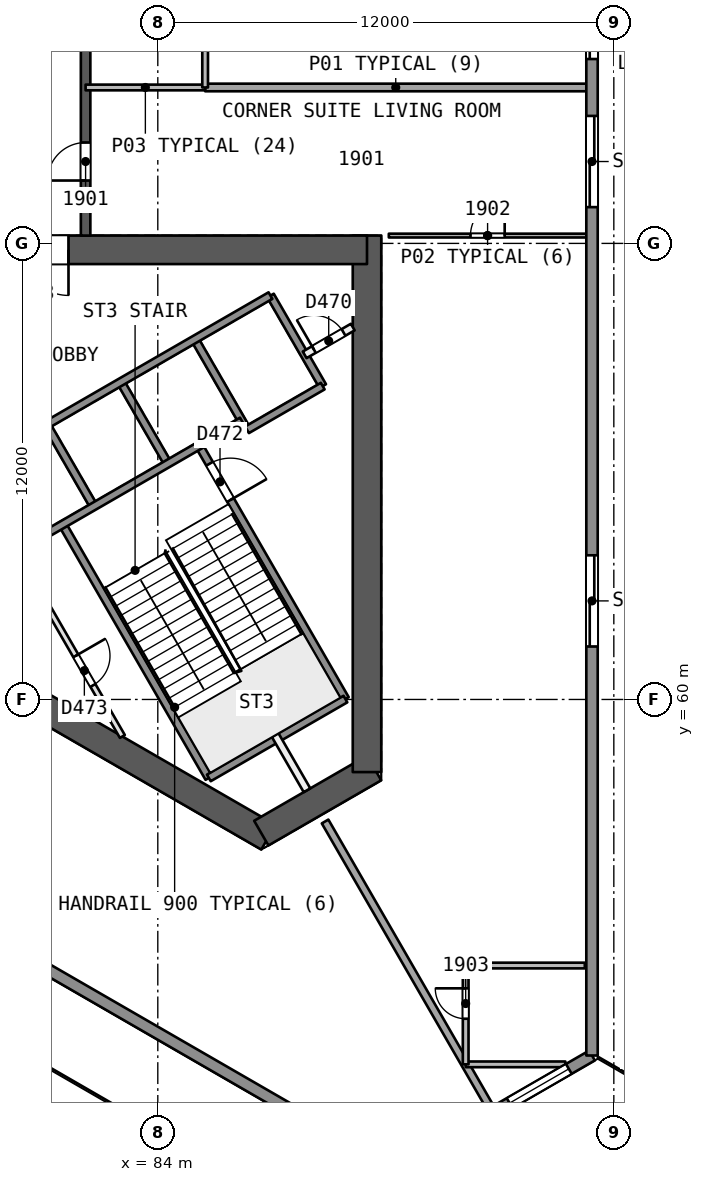
"""IFC4 building model, lengths in metres.
Left out: names, types, materials, properties, quantities, classifications, styles, units other than length and angle.
Written with IfcOpenShell. Run it as: python <this file> out.ifc"""

import sys

from ifc_helpers import new_model, si_unit, direction, frame, frame_2d, origin, place, context, subcontext, project, spatial, rectangle, extrude, element, fill, save


model = new_model("IFC4")
c1 = context("Model", 3, precision=1e-05, world=origin(), true_north=direction((0.0, 1.0)))
c2 = subcontext(c1, "Body", "Model", "MODEL_VIEW")
j1 = project(units=[si_unit("LENGTHUNIT", "METRE"), si_unit("PLANEANGLEUNIT", "RADIAN")], contexts=[c1])
p1 = place(None, origin())
s1 = spatial("IfcSite", under=j1, at=p1, CompositionType="ELEMENT")
p2 = place(p1, origin())
s2 = spatial("IfcBuilding", under=s1, at=p2, CompositionType="ELEMENT")
p3 = place(p2, frame((0.0, 0.0, 83.2)))
s3 = spatial("IfcBuildingStorey", under=s2, at=p3, CompositionType="ELEMENT", Elevation=83.2)
p4 = place(p3, frame((74.822, 63.354, 0.0), z_axis=(0.0, 0.0, 1.0), x_axis=(0.8660248072, -0.500001033313, 0.0)))
e1 = element("IfcWall", 1, at=p4, inside=s3, PredefinedType="SHEAR", context=c2, shape_type="SweptSolid", body=[
    extrude(rectangle(XDim=13.958, YDim=0.75, at=frame_2d((6.979, 0.0))), origin(), (0.0, 0.0, 1.0), 3.7),
])
p5 = place(p3, frame((86.723, 56.483, 0.0), z_axis=(0.0, 0.0, 1.0), x_axis=(0.866017201164, 0.500014207086, 0.0)))
e2 = element("IfcWall", 2, at=p5, inside=s3, PredefinedType="SHEAR", context=c2, shape_type="SweptSolid", body=[
    extrude(rectangle(XDim=3.429, YDim=0.75, at=frame_2d((1.714, 0.0))), origin(), (0.0, 0.0, 1.0), 3.7),
])
p6 = place(p3, frame((89.505, 58.089, 0.0), z_axis=(0.0, 0.0, 1.0), x_axis=(0.0, 1.0, 0.0)))
e3 = element("IfcWall", 3, at=p6, inside=s3, PredefinedType="SHEAR", context=c2, shape_type="SweptSolid", body=[
    extrude(rectangle(XDim=14.117, YDim=0.75, at=frame_2d((7.059, 0.0))), origin(), (0.0, 0.0, 1.0), 3.7),
])
p7 = place(p3, frame((89.505, 71.831, 0.0), z_axis=(0.0, 0.0, 1.0), x_axis=(-1.0, 0.0, 0.0)))
e4 = element("IfcWall", 4, at=p7, inside=s3, PredefinedType="SHEAR", context=c2, shape_type="SweptSolid", body=[
    extrude(rectangle(XDim=10.005, YDim=0.75, at=frame_2d((5.002, 0.0))), origin(), (0.0, 0.0, 1.0), 3.7),
])
p8 = place(p7, frame((7.855, 0.0, 0.0)))
e5 = element("IfcOpeningElement", 5, at=p8, cuts=e4, PredefinedType="OPENING", context=c2, shape_type="SweptSolid", body=[
    extrude(rectangle(XDim=1.2, YDim=2.1, at=frame_2d((0.6, 1.05))), frame((0.0, 0.385, 0.0), z_axis=(0.0, -1.0, 0.0), x_axis=(1.0, 0.0, 0.0)), (0.0, 0.0, 1.0), 0.771),
])
p9 = place(p3, frame((82.1, 72.206, 0.0), z_axis=(0.0, 0.0, 1.0), x_axis=(0.0, 1.0, 0.0)))
e6 = element("IfcWall", 6, at=p9, inside=s3, PredefinedType="SHEAR", context=c2, shape_type="SweptSolid", body=[
    extrude(rectangle(XDim=15.588, YDim=0.25, at=frame_2d((7.794, 0.0))), origin(), (0.0, 0.0, 1.0), 3.2),
])
p10 = place(p9, frame((1.448, 0.0, 0.0)))
e7 = element("IfcOpeningElement", 7, at=p10, cuts=e6, PredefinedType="OPENING", context=c2, shape_type="SweptSolid", body=[
    extrude(rectangle(XDim=1.0, YDim=2.1, at=frame_2d((0.5, 1.05))), frame((0.0, 0.135, 0.0), z_axis=(0.0, -1.0, 0.0), x_axis=(1.0, 0.0, 0.0)), (0.0, 0.0, 1.0), 0.271),
])
p11 = place(p9, frame((6.544, 0.0, 0.0)))
e8 = element("IfcOpeningElement", 8, at=p11, cuts=e6, PredefinedType="OPENING", context=c2, shape_type="SweptSolid", body=[
    extrude(rectangle(XDim=1.0, YDim=2.1, at=frame_2d((0.5, 1.05))), frame((0.0, 0.135, 0.0), z_axis=(0.0, -1.0, 0.0), x_axis=(1.0, 0.0, 0.0)), (0.0, 0.0, 1.0), 0.271),
])
p12 = place(p9, frame((10.441, 0.0, 0.0)))
e9 = element("IfcOpeningElement", 9, at=p12, cuts=e6, PredefinedType="OPENING", context=c2, shape_type="SweptSolid", body=[
    extrude(rectangle(XDim=1.0, YDim=2.1, at=frame_2d((0.5, 1.05))), frame((0.0, 0.135, 0.0), z_axis=(0.0, -1.0, 0.0), x_axis=(1.0, 0.0, 0.0)), (0.0, 0.0, 1.0), 0.271),
])
p13 = place(p9, frame((11.841, 0.0, 0.0)))
e10 = element("IfcOpeningElement", 10, at=p13, cuts=e6, PredefinedType="OPENING", context=c2, shape_type="SweptSolid", body=[
    extrude(rectangle(XDim=1.0, YDim=2.1, at=frame_2d((0.5, 1.05))), frame((0.0, 0.135, 0.0), z_axis=(0.0, -1.0, 0.0), x_axis=(1.0, 0.0, 0.0)), (0.0, 0.0, 1.0), 0.271),
])
p14 = place(p3, frame((90.079, 72.206, 0.0), z_axis=(0.0, 0.0, 1.0), x_axis=(1.0, 0.0, 0.0)))
e11 = element("IfcWall", 11, at=p14, inside=s3, PredefinedType="PARTITIONING", context=c2, shape_type="SweptSolid", body=[
    extrude(rectangle(XDim=5.198, YDim=0.1, at=frame_2d((2.599, 0.0))), origin(), (0.0, 0.0, 1.0), 3.2),
])
p15 = place(p14, frame((2.149, 0.0, 0.0)))
e12 = element("IfcOpeningElement", 12, at=p15, cuts=e11, PredefinedType="OPENING", context=c2, shape_type="SweptSolid", body=[
    extrude(rectangle(XDim=0.9, YDim=2.1, at=frame_2d((0.45, 1.05))), frame((0.0, 0.061, 0.0), z_axis=(0.0, -1.0, 0.0), x_axis=(1.0, 0.0, 0.0)), (0.0, 0.0, 1.0), 0.121),
])
p16 = place(p3, frame((95.277, 76.103, 0.0), z_axis=(0.0, 0.0, 1.0), x_axis=(-1.0, 0.0, 0.0)))
e13 = element("IfcWall", 13, at=p16, inside=s3, PredefinedType="PARTITIONING", context=c2, shape_type="SweptSolid", body=[
    extrude(rectangle(XDim=10.031, YDim=0.2, at=frame_2d((5.016, 0.0))), origin(), (0.0, 0.0, 1.0), 3.2),
])
p17 = place(p3, frame((85.245, 76.103, 0.0), z_axis=(0.0, 0.0, 1.0), x_axis=(-1.0, 0.0, 0.0)))
e14 = element("IfcWall", 14, at=p17, inside=s3, PredefinedType="PARTITIONING", context=c2, shape_type="SweptSolid", body=[
    extrude(rectangle(XDim=3.145, YDim=0.15, at=frame_2d((1.573, 0.0))), origin(), (0.0, 0.0, 1.0), 3.2),
])
p18 = place(p3, frame((94.725, 50.399, 0.0), z_axis=(0.0, 0.0, 1.0), x_axis=(-1.0, 0.0, 0.0)))
e15 = element("IfcWall", 15, at=p18, inside=s3, PredefinedType="PARTITIONING", context=c2, shape_type="SweptSolid", body=[
    extrude(rectangle(XDim=2.624, YDim=0.15, at=frame_2d((1.312, 0.0))), origin(), (0.0, 0.0, 1.0), 3.2),
])
p19 = place(p3, frame((92.102, 50.399, 0.0), z_axis=(0.0, 0.0, 1.0), x_axis=(0.0, 1.0, 0.0)))
e16 = element("IfcWall", 16, at=p19, inside=s3, PredefinedType="PARTITIONING", context=c2, shape_type="SweptSolid", body=[
    extrude(rectangle(XDim=2.6, YDim=0.15, at=frame_2d((1.3, 0.0))), origin(), (0.0, 0.0, 1.0), 3.2),
])
p20 = place(p19, frame((1.2, 0.0, 0.0)))
e17 = element("IfcOpeningElement", 17, at=p20, cuts=e16, PredefinedType="OPENING", context=c2, shape_type="SweptSolid", body=[
    extrude(rectangle(XDim=0.8, YDim=2.1, at=frame_2d((0.4, 1.05))), frame((0.0, 0.085, 0.0), z_axis=(0.0, -1.0, 0.0), x_axis=(1.0, 0.0, 0.0)), (0.0, 0.0, 1.0), 0.171),
])
p21 = place(p3, frame((92.102, 52.999, 0.0), z_axis=(0.0, 0.0, 1.0), x_axis=(1.0, 0.0, 0.0)))
e18 = element("IfcWall", 18, at=p21, inside=s3, PredefinedType="PARTITIONING", context=c2, shape_type="SweptSolid", body=[
    extrude(rectangle(XDim=3.134, YDim=0.15, at=frame_2d((1.567, 0.0))), origin(), (0.0, 0.0, 1.0), 3.2),
])
p22 = place(p3, frame((88.402, 56.789, 0.0), z_axis=(0.0, 0.0, 1.0), x_axis=(0.500001128573, -0.866024752202, 0.0)))
e19 = element("IfcWall", 19, at=p22, inside=s3, PredefinedType="PARTITIONING", context=c2, shape_type="SweptSolid", body=[
    extrude(rectangle(XDim=8.696, YDim=0.2, at=frame_2d((4.348, 0.0))), origin(), (0.0, 0.0, 1.0), 3.2),
])
p23 = place(p3, frame((85.245, 78.5, 0.0), z_axis=(0.0, 0.0, 1.0), x_axis=(0.0, -1.0, 0.0)))
e20 = element("IfcWall", 20, at=p23, inside=s3, PredefinedType="PARTITIONING", context=c2, shape_type="SweptSolid", body=[
    extrude(rectangle(XDim=2.397, YDim=0.15, at=frame_2d((1.199, 0.0))), origin(), (0.0, 0.0, 1.0), 3.2),
])
p24 = place(p3, frame((95.426, 50.632, 0.0), z_axis=(0.0, 0.0, 1.0), x_axis=(-0.866027298819, -0.49999671769, 0.0)))
e21 = element("IfcWall", 21, at=p24, inside=s3, PredefinedType="SOLIDWALL", context=c2, shape_type="SweptSolid", body=[
    extrude(rectangle(XDim=6.01, YDim=0.3, at=frame_2d((3.005, 0.0))), origin(), (0.0, 0.0, 1.0), 3.2),
])
p25 = place(p24, frame((0.705, 0.0, 0.9)))
e22 = element("IfcOpeningElement", 22, at=p25, cuts=e21, PredefinedType="OPENING", context=c2, shape_type="SweptSolid", body=[
    extrude(rectangle(XDim=1.8, YDim=1.5, at=frame_2d((0.9, 0.75))), frame((0.0, 0.161, 0.0), z_axis=(0.0, -1.0, 0.0), x_axis=(1.0, 0.0, 0.0)), (0.0, 0.0, 1.0), 0.321),
])
p26 = place(p24, frame((3.651, 0.0, 0.9)))
e23 = element("IfcOpeningElement", 23, at=p26, cuts=e21, PredefinedType="OPENING", context=c2, shape_type="SweptSolid", body=[
    extrude(rectangle(XDim=1.8, YDim=1.5, at=frame_2d((0.9, 0.75))), frame((0.0, 0.161, 0.0), z_axis=(0.0, -1.0, 0.0), x_axis=(1.0, 0.0, 0.0)), (0.0, 0.0, 1.0), 0.321),
])
p27 = place(p3, frame((95.426, 109.368, 0.0), z_axis=(0.0, 0.0, 1.0), x_axis=(0.0, -1.0, 0.0)))
e24 = element("IfcWall", 24, at=p27, inside=s3, PredefinedType="SOLIDWALL", context=c2, shape_type="SweptSolid", body=[
    extrude(rectangle(XDim=58.737, YDim=0.3, at=frame_2d((29.368, 0.0))), origin(), (0.0, 0.0, 1.0), 3.2),
])
p28 = place(p27, frame((34.014, 0.0, 0.0)))
e25 = element("IfcOpeningElement", 25, at=p28, cuts=e24, PredefinedType="OPENING", context=c2, shape_type="SweptSolid", body=[
    extrude(rectangle(XDim=2.4, YDim=2.4, at=frame_2d((1.2, 1.2))), frame((0.0, 0.161, 0.0), z_axis=(0.0, -1.0, 0.0), x_axis=(1.0, 0.0, 0.0)), (0.0, 0.0, 1.0), 0.321),
])
p29 = place(p27, frame((45.575, 0.0, 0.0)))
e26 = element("IfcOpeningElement", 26, at=p29, cuts=e24, PredefinedType="OPENING", context=c2, shape_type="SweptSolid", body=[
    extrude(rectangle(XDim=2.4, YDim=2.4, at=frame_2d((1.2, 1.2))), frame((0.0, 0.161, 0.0), z_axis=(0.0, -1.0, 0.0), x_axis=(1.0, 0.0, 0.0)), (0.0, 0.0, 1.0), 0.321),
])
p30 = place(p27, frame((30.117, 0.0, 0.0)))
e27 = element("IfcOpeningElement", 27, at=p30, cuts=e24, PredefinedType="OPENING", context=c2, shape_type="SweptSolid", body=[
    extrude(rectangle(XDim=2.4, YDim=2.4, at=frame_2d((1.2, 1.2))), frame((0.0, 0.161, 0.0), z_axis=(0.0, -1.0, 0.0), x_axis=(1.0, 0.0, 0.0)), (0.0, 0.0, 1.0), 0.321),
])
p31 = place(p27, frame((11.492, 0.0, 0.0)))
e28 = element("IfcOpeningElement", 28, at=p31, cuts=e24, PredefinedType="OPENING", context=c2, shape_type="SweptSolid", body=[
    extrude(rectangle(XDim=2.4, YDim=2.4, at=frame_2d((1.2, 1.2))), frame((0.0, 0.161, 0.0), z_axis=(0.0, -1.0, 0.0), x_axis=(1.0, 0.0, 0.0)), (0.0, 0.0, 1.0), 0.321),
])
p32 = place(p27, frame((26.22, 0.0, 0.0)))
e29 = element("IfcOpeningElement", 29, at=p32, cuts=e24, PredefinedType="OPENING", context=c2, shape_type="SweptSolid", body=[
    extrude(rectangle(XDim=2.4, YDim=2.4, at=frame_2d((1.2, 1.2))), frame((0.0, 0.161, 0.0), z_axis=(0.0, -1.0, 0.0), x_axis=(1.0, 0.0, 0.0)), (0.0, 0.0, 1.0), 0.321),
])
p33 = place(p3, frame((90.221, 47.626, 0.0), z_axis=(0.0, 0.0, 1.0), x_axis=(-0.866025832118, 0.499999258104, 0.0)))
e30 = element("IfcWall", 30, at=p33, inside=s3, PredefinedType="SOLIDWALL", context=c2, shape_type="SweptSolid", body=[
    extrude(rectangle(XDim=58.737, YDim=0.3, at=frame_2d((29.368, 0.0))), origin(), (0.0, 0.0, 1.0), 3.2),
])
p34 = place(p33, frame((32.065, 0.0, 0.0)))
e31 = element("IfcOpeningElement", 31, at=p34, cuts=e30, PredefinedType="OPENING", context=c2, shape_type="SweptSolid", body=[
    extrude(rectangle(XDim=2.4, YDim=2.4, at=frame_2d((1.2, 1.2))), frame((0.0, 0.161, 0.0), z_axis=(0.0, -1.0, 0.0), x_axis=(1.0, 0.0, 0.0)), (0.0, 0.0, 1.0), 0.321),
])
p35 = place(p33, frame((45.575, 0.0, 0.0)))
e32 = element("IfcOpeningElement", 32, at=p35, cuts=e30, PredefinedType="OPENING", context=c2, shape_type="SweptSolid", body=[
    extrude(rectangle(XDim=2.4, YDim=2.4, at=frame_2d((1.2, 1.2))), frame((0.0, 0.161, 0.0), z_axis=(0.0, -1.0, 0.0), x_axis=(1.0, 0.0, 0.0)), (0.0, 0.0, 1.0), 0.321),
])
p36 = place(p33, frame((13.441, 0.0, 0.0)))
e33 = element("IfcOpeningElement", 33, at=p36, cuts=e30, PredefinedType="OPENING", context=c2, shape_type="SweptSolid", body=[
    extrude(rectangle(XDim=2.4, YDim=2.4, at=frame_2d((1.2, 1.2))), frame((0.0, 0.161, 0.0), z_axis=(0.0, -1.0, 0.0), x_axis=(1.0, 0.0, 0.0)), (0.0, 0.0, 1.0), 0.321),
])
p37 = place(p3, frame((81.094, 62.445, 0.0), z_axis=(0.0, 0.0, 1.0), x_axis=(0.499990112884, -0.866031112038, 0.0)))
e34 = element("IfcWall", 34, at=p37, inside=s3, PredefinedType="PARTITIONING", context=c2, shape_type="SweptSolid", body=[
    extrude(rectangle(XDim=3.948, YDim=0.15, at=frame_2d((1.974, 0.0))), origin(), (0.0, 0.0, 1.0), 3.2),
])
p38 = place(p37, frame((1.496, 0.0, 0.0)))
e35 = element("IfcOpeningElement", 35, at=p38, cuts=e34, PredefinedType="OPENING", context=c2, shape_type="SweptSolid", body=[
    extrude(rectangle(XDim=0.9, YDim=2.1, at=frame_2d((0.45, 1.05))), frame((0.0, 0.085, 0.0), z_axis=(0.0, -1.0, 0.0), x_axis=(1.0, 0.0, 0.0)), (0.0, 0.0, 1.0), 0.171),
])
p39 = place(p3, frame((81.493, 64.604, 0.0), z_axis=(0.0, 0.0, 1.0), x_axis=(0.500006057782, -0.866021906294, 0.0)))
e36 = element("IfcWall", 36, at=p39, inside=s3, PredefinedType="SOLIDWALL", context=c2, shape_type="SweptSolid", body=[
    extrude(rectangle(XDim=7.7, YDim=0.2, at=frame_2d((3.85, 0.0))), origin(), (0.0, 0.0, 1.0), 3.2),
])
p40 = place(p3, frame((81.076, 67.227, 0.0), z_axis=(0.0, 0.0, 1.0), x_axis=(0.50000366821, -0.866023285932, 0.0)))
e37 = element("IfcWall", 37, at=p40, inside=s3, PredefinedType="SOLIDWALL", context=c2, shape_type="SweptSolid", body=[
    extrude(rectangle(XDim=2.48, YDim=0.2, at=frame_2d((1.24, 0.0))), origin(), (0.0, 0.0, 1.0), 3.2),
])
p41 = place(p3, frame((87.09, 59.06, 0.0), z_axis=(0.0, 0.0, 1.0), x_axis=(0.499937194881, -0.866061661301, 0.0)))
e38 = element("IfcWall", 38, at=p41, inside=s3, PredefinedType="PARTITIONING", context=c2, shape_type="SweptSolid", body=[
    extrude(rectangle(XDim=1.673, YDim=0.2, at=frame_2d((0.836, 0.0))), origin(), (0.0, 0.0, 1.0), 3.2),
])
p42 = place(p3, frame((83.024, 68.352, 0.0), z_axis=(0.0, 0.0, 1.0), x_axis=(0.50000366821, -0.866023285932, 0.0)))
e39 = element("IfcWall", 39, at=p42, inside=s3, PredefinedType="SOLIDWALL", context=c2, shape_type="SweptSolid", body=[
    extrude(rectangle(XDim=2.48, YDim=0.2, at=frame_2d((1.24, 0.0))), origin(), (0.0, 0.0, 1.0), 3.2),
])
p43 = place(p3, frame((85.087, 66.679, 0.0), z_axis=(0.0, 0.0, 1.0), x_axis=(0.500019787375, -0.866013979237, 0.0)))
e40 = element("IfcWall", 40, at=p43, inside=s3, PredefinedType="SOLIDWALL", context=c2, shape_type="SweptSolid", body=[
    extrude(rectangle(XDim=7.7, YDim=0.2, at=frame_2d((3.85, 0.0))), origin(), (0.0, 0.0, 1.0), 3.2),
])
p44 = place(p43, frame((0.55, 0.0, 0.0)))
e41 = element("IfcOpeningElement", 41, at=p44, cuts=e40, PredefinedType="OPENING", context=c2, shape_type="SweptSolid", body=[
    extrude(rectangle(XDim=1.1, YDim=2.1, at=frame_2d((0.55, 1.05))), frame((0.0, 0.11, 0.0), z_axis=(0.0, -1.0, 0.0), x_axis=(1.0, 0.0, 0.0)), (0.0, 0.0, 1.0), 0.221),
])
for number, where, z_axis, x_axis in (
    (42, (84.973, 69.477, 0.0), (0.0, 0.0, 1.0), (0.5, -0.866, 0.0)),
    (43, (86.965, 70.626, 0.0), (0.0, 0.0, 1.0), (0.5, -0.866, 0.0)),
):
    element("IfcWall", number, at=place(p3, frame(where, z_axis=z_axis, x_axis=x_axis)), inside=s3, PredefinedType="SOLIDWALL", context=c2, shape_type="SweptSolid", body=[
        extrude(rectangle(XDim=2.75, YDim=0.2, at=frame_2d((1.375, 0.0))), origin(), (0.0, 0.0, 1.0), 3.2),
    ])
p45 = place(p3, frame((77.135, 64.952, 0.0), z_axis=(0.0, 0.0, 1.0), x_axis=(0.866031916153, 0.499988720078, 0.0)))
e44 = element("IfcWall", 44, at=p45, inside=s3, PredefinedType="SOLIDWALL", context=c2, shape_type="SweptSolid", body=[
    extrude(rectangle(XDim=11.35, YDim=0.2, at=frame_2d((5.675, 0.0))), origin(), (0.0, 0.0, 1.0), 3.2),
])
p46 = place(p3, frame((87.865, 69.068, 0.0), z_axis=(0.0, 0.0, 1.0), x_axis=(0.865982457891, 0.500074377092, 0.0)))
e45 = element("IfcWall", 45, at=p46, inside=s3, PredefinedType="PARTITIONING", context=c2, shape_type="SweptSolid", body=[
    extrude(rectangle(XDim=1.461, YDim=0.2, at=frame_2d((0.73, 0.0))), origin(), (0.0, 0.0, 1.0), 3.2),
])
p47 = place(p46, frame((0.281, 0.0, 0.0)))
e46 = element("IfcOpeningElement", 46, at=p47, cuts=e45, PredefinedType="OPENING", context=c2, shape_type="SweptSolid", body=[
    extrude(rectangle(XDim=0.9, YDim=2.1, at=frame_2d((0.45, 1.05))), frame((0.0, 0.11, 0.0), z_axis=(0.0, -1.0, 0.0), x_axis=(1.0, 0.0, 0.0)), (0.0, 0.0, 1.0), 0.221),
])
p48 = place(p3, frame((80.367, 63.954, 0.0), z_axis=(0.0, 0.0, 1.0), x_axis=(0.866026575979, 0.499997969693, 0.0)))
e47 = element("IfcWall", 47, at=p48, inside=s3, PredefinedType="SOLIDWALL", context=c2, shape_type="SweptSolid", body=[
    extrude(rectangle(XDim=6.75, YDim=0.2, at=frame_2d((3.375, 0.0))), origin(), (0.0, 0.0, 1.0), 3.2),
])
p49 = place(p3, frame((86.348, 67.095, 0.0), z_axis=(0.0, 0.0, 1.0), x_axis=(0.86602648383, 0.499998129301, 0.0)))
e48 = element("IfcWall", 48, at=p49, inside=s3, PredefinedType="SOLIDWALL", context=c2, shape_type="SweptSolid", body=[
    extrude(rectangle(XDim=2.3, YDim=0.2, at=frame_2d((1.15, 0.0))), origin(), (0.0, 0.0, 1.0), 3.2),
])
p50 = place(p3, frame((85.343, 57.935, 0.0), z_axis=(0.0, 0.0, 1.0), x_axis=(0.866004344652, 0.500036473714, 0.0)))
e49 = element("IfcWall", 49, at=p50, inside=s3, PredefinedType="SOLIDWALL", context=c2, shape_type="SweptSolid", body=[
    extrude(rectangle(XDim=4.15, YDim=0.2, at=frame_2d((2.075, 0.0))), origin(), (0.0, 0.0, 1.0), 3.2),
])
p51 = place(p10, origin())
e50 = element("IfcDoor", 50, at=p51, inside=s3, OperationType="SINGLE_SWING_LEFT", PredefinedType="NOTDEFINED", context=c2, shape_type="SweptSolid", body=[
    extrude(rectangle(XDim=1.0, YDim=2.1, at=frame_2d((0.5, 1.05))), frame((0.0, 0.025, 0.0), z_axis=(0.0, -1.0, 0.0), x_axis=(1.0, 0.0, 0.0)), (0.0, 0.0, 1.0), 0.05),
])
fill(e7, e50)
p52 = place(p15, origin())
e51 = element("IfcDoor", 51, at=p52, inside=s3, OperationType="SINGLE_SWING_RIGHT", PredefinedType="NOTDEFINED", context=c2, shape_type="SweptSolid", body=[
    extrude(rectangle(XDim=0.9, YDim=2.1, at=frame_2d((0.45, 1.05))), frame((0.0, 0.025, 0.0), z_axis=(0.0, -1.0, 0.0), x_axis=(1.0, 0.0, 0.0)), (0.0, 0.0, 1.0), 0.05),
])
fill(e12, e51)
p53 = place(p20, origin())
e52 = element("IfcDoor", 52, at=p53, inside=s3, OperationType="SINGLE_SWING_RIGHT", PredefinedType="NOTDEFINED", context=c2, shape_type="SweptSolid", body=[
    extrude(rectangle(XDim=0.8, YDim=2.1, at=frame_2d((0.4, 1.05))), frame((0.0, 0.025, 0.0), z_axis=(0.0, -1.0, 0.0), x_axis=(1.0, 0.0, 0.0)), (0.0, 0.0, 1.0), 0.05),
])
fill(e17, e52)
p54 = place(p25, origin())
e53 = element("IfcWindow", 53, at=p54, inside=s3, PartitioningType="SINGLE_PANEL", PredefinedType="WINDOW", context=c2, shape_type="SweptSolid", body=[
    extrude(rectangle(XDim=1.8, YDim=1.5, at=frame_2d((0.9, 0.75))), frame((0.0, 0.03, 0.0), z_axis=(0.0, -1.0, 0.0), x_axis=(1.0, 0.0, 0.0)), (0.0, 0.0, 1.0), 0.06),
])
fill(e22, e53)
p55 = place(p28, origin())
e54 = element("IfcDoor", 54, at=p55, inside=s3, OperationType="SLIDING_TO_LEFT", PredefinedType="NOTDEFINED", context=c2, shape_type="SweptSolid", body=[
    extrude(rectangle(XDim=2.4, YDim=2.4, at=frame_2d((1.2, 1.2))), frame((0.0, 0.025, 0.0), z_axis=(0.0, -1.0, 0.0), x_axis=(1.0, 0.0, 0.0)), (0.0, 0.0, 1.0), 0.05),
])
fill(e25, e54)
p56 = place(p29, origin())
e55 = element("IfcDoor", 55, at=p56, inside=s3, OperationType="SLIDING_TO_RIGHT", PredefinedType="NOTDEFINED", context=c2, shape_type="SweptSolid", body=[
    extrude(rectangle(XDim=2.4, YDim=2.4, at=frame_2d((1.2, 1.2))), frame((0.0, 0.025, 0.0), z_axis=(0.0, -1.0, 0.0), x_axis=(1.0, 0.0, 0.0)), (0.0, 0.0, 1.0), 0.05),
])
fill(e26, e55)
p57 = place(p30, origin())
e56 = element("IfcDoor", 56, at=p57, inside=s3, OperationType="SLIDING_TO_LEFT", PredefinedType="NOTDEFINED", context=c2, shape_type="SweptSolid", body=[
    extrude(rectangle(XDim=2.4, YDim=2.4, at=frame_2d((1.2, 1.2))), frame((0.0, 0.025, 0.0), z_axis=(0.0, -1.0, 0.0), x_axis=(1.0, 0.0, 0.0)), (0.0, 0.0, 1.0), 0.05),
])
fill(e27, e56)
p58 = place(p8, origin())
e57 = element("IfcDoor", 57, at=p58, inside=s3, OperationType="SINGLE_SWING_LEFT", PredefinedType="NOTDEFINED", context=c2, shape_type="SweptSolid", body=[
    extrude(rectangle(XDim=1.2, YDim=2.1, at=frame_2d((0.6, 1.05))), frame((0.0, 0.025, 0.0), z_axis=(0.0, -1.0, 0.0), x_axis=(1.0, 0.0, 0.0)), (0.0, 0.0, 1.0), 0.05),
])
fill(e5, e57)
p59 = place(p47, origin())
e58 = element("IfcDoor", 58, at=p59, inside=s3, OperationType="SINGLE_SWING_LEFT", PredefinedType="NOTDEFINED", context=c2, shape_type="SweptSolid", body=[
    extrude(rectangle(XDim=0.9, YDim=2.1, at=frame_2d((0.45, 1.05))), frame((0.0, 0.025, 0.0), z_axis=(0.0, -1.0, 0.0), x_axis=(1.0, 0.0, 0.0)), (0.0, 0.0, 1.0), 0.05),
])
fill(e46, e58)
p60 = place(p44, origin())
e59 = element("IfcDoor", 59, at=p60, inside=s3, OperationType="SINGLE_SWING_RIGHT", PredefinedType="NOTDEFINED", context=c2, shape_type="SweptSolid", body=[
    extrude(rectangle(XDim=1.1, YDim=2.1, at=frame_2d((0.55, 1.05))), frame((0.0, 0.025, 0.0), z_axis=(0.0, -1.0, 0.0), x_axis=(1.0, 0.0, 0.0)), (0.0, 0.0, 1.0), 0.05),
])
fill(e41, e59)
p61 = place(p38, origin())
e60 = element("IfcDoor", 60, at=p61, inside=s3, OperationType="SINGLE_SWING_LEFT", PredefinedType="NOTDEFINED", context=c2, shape_type="SweptSolid", body=[
    extrude(rectangle(XDim=0.9, YDim=2.1, at=frame_2d((0.45, 1.05))), frame((0.0, 0.025, 0.0), z_axis=(0.0, -1.0, 0.0), x_axis=(1.0, 0.0, 0.0)), (0.0, 0.0, 1.0), 0.05),
])
fill(e35, e60)
save(model, sys.argv[1])
